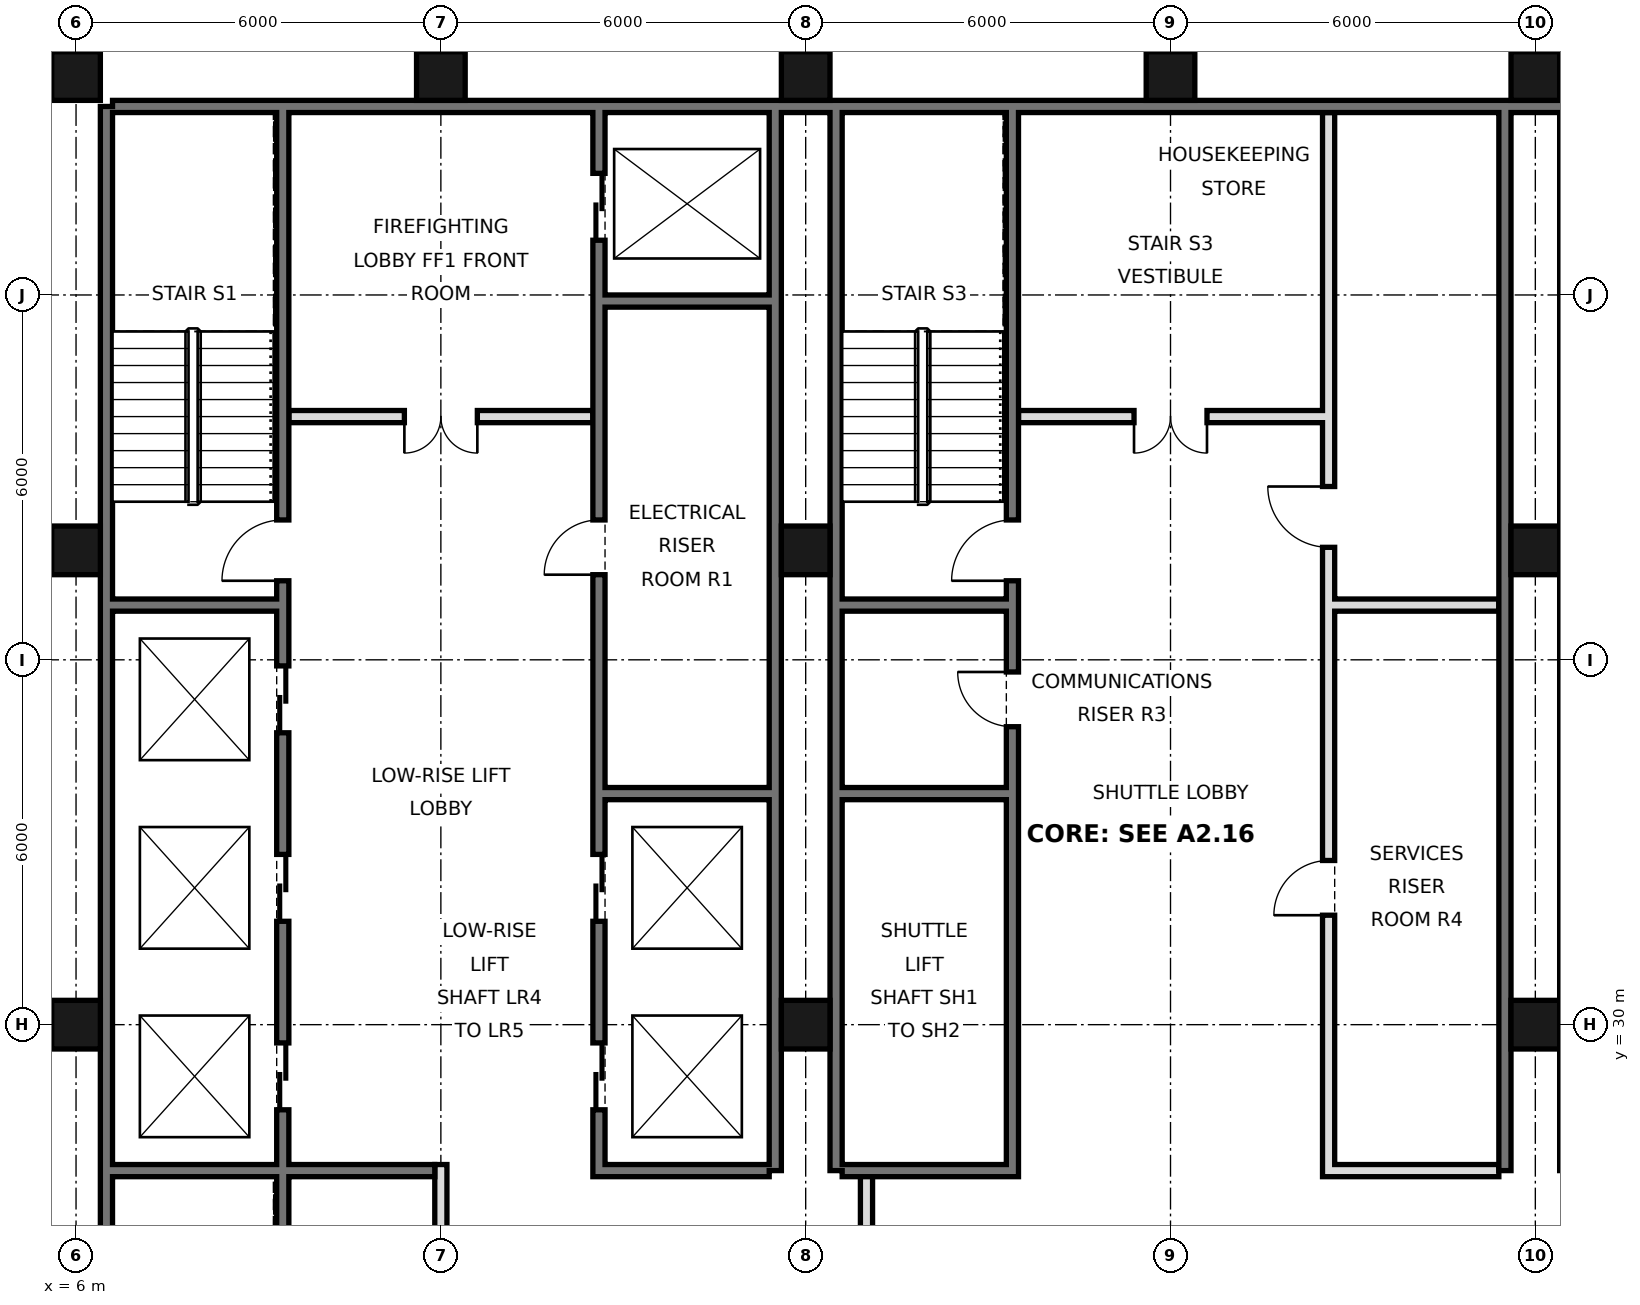
"""IFC4 building model, lengths in metres.
Left out: names, types, materials, properties, quantities, classifications, styles, units other than length and angle.
Written with IfcOpenShell. Run it as: python <this file> out.ifc"""

import sys

from ifc_helpers import new_model, si_unit, direction, frame, frame_2d, origin, origin_2d, place, context, subcontext, project, spatial, rectangle, hollow_rectangle, extrude, element, fill, save


model = new_model("IFC4")
c1 = context("Model", 3, precision=1e-05, world=origin(), true_north=direction((0.0, 1.0)))
c2 = subcontext(c1, "Body", "Model", "MODEL_VIEW")
j1 = project(units=[si_unit("LENGTHUNIT", "METRE"), si_unit("PLANEANGLEUNIT", "RADIAN")], contexts=[c1])
p1 = place(None, origin())
s1 = spatial("IfcSite", under=j1, at=p1, CompositionType="ELEMENT")
p2 = place(p1, origin())
s2 = spatial("IfcBuilding", under=s1, at=p2, CompositionType="ELEMENT")
p3 = place(p2, frame((0.0, 0.0, 64.2)))
s3 = spatial("IfcBuildingStorey", under=s2, at=p3, CompositionType="ELEMENT", Elevation=64.2)
for number, where, z_axis, x_axis in (
    (1, (6.0, 30.0, 0.0), (0.0, 0.0, 1.0), (1.0, 0.0, 0.0)),
    (2, (6.0, 37.8, 0.0), (0.0, 0.0, 1.0), (1.0, 0.0, 0.0)),
    (3, (6.0, 45.6, 0.0), (0.0, 0.0, 1.0), (1.0, 0.0, 0.0)),
    (4, (12.0, 45.6, 0.0), (0.0, 0.0, 1.0), (1.0, 0.0, 0.0)),
    (5, (18.0, 30.0, 0.0), (0.0, 0.0, 1.0), (1.0, 0.0, 0.0)),
    (6, (18.0, 37.8, 0.0), (0.0, 0.0, 1.0), (1.0, 0.0, 0.0)),
    (7, (18.0, 45.6, 0.0), (0.0, 0.0, 1.0), (1.0, 0.0, 0.0)),
    (8, (24.0, 45.6, 0.0), (0.0, 0.0, 1.0), (1.0, 0.0, 0.0)),
    (9, (30.0, 30.0, 0.0), (0.0, 0.0, 1.0), (1.0, 0.0, 0.0)),
    (10, (30.0, 37.8, 0.0), (0.0, 0.0, 1.0), (1.0, 0.0, 0.0)),
    (11, (30.0, 45.6, 0.0), (0.0, 0.0, 1.0), (1.0, 0.0, 0.0)),
):
    element("IfcColumn", number, at=place(p3, frame(where, z_axis=z_axis, x_axis=x_axis)), inside=s3, PredefinedType="COLUMN", context=c2, shape_type="SweptSolid", body=[
        extrude(hollow_rectangle(XDim=0.8, YDim=0.8, WallThickness=0.06, at=origin_2d()), origin(), (0.0, 0.0, 1.0), 3.6),
    ])
p4 = place(p3, frame((6.5, 21.6, 0.0), z_axis=(0.0, 0.0, 1.0), x_axis=(0.0, 1.0, 0.0)))
e12 = element("IfcWall", 12, at=p4, inside=s3, PredefinedType="SOLIDWALL", context=c2, shape_type="SweptSolid", body=[
    extrude(rectangle(XDim=23.5, YDim=0.2, at=frame_2d((11.75, 0.0))), origin(), (0.0, 0.0, 1.0), 3.42),
])
p5 = place(p3, frame((6.6, 45.1, 0.0), z_axis=(0.0, 0.0, 1.0), x_axis=(1.0, 0.0, 0.0)))
e13 = element("IfcWall", 13, at=p5, inside=s3, PredefinedType="SOLIDWALL", context=c2, shape_type="SweptSolid", body=[
    extrude(rectangle(XDim=34.8, YDim=0.2, at=frame_2d((17.4, 0.0))), origin(), (0.0, 0.0, 1.0), 3.42),
])
for number, where, z_axis, x_axis in (
    (14, (17.5, 27.6, 0.0), (0.0, 0.0, 1.0), (0.0, 1.0, 0.0)),
    (15, (18.5, 27.6, 0.0), (0.0, 0.0, 1.0), (0.0, 1.0, 0.0)),
    (16, (29.5, 27.6, 0.0), (0.0, 0.0, 1.0), (0.0, 1.0, 0.0)),
):
    element("IfcWall", number, at=place(p3, frame(where, z_axis=z_axis, x_axis=x_axis)), inside=s3, PredefinedType="SOLIDWALL", context=c2, shape_type="SweptSolid", body=[
        extrude(rectangle(XDim=17.5, YDim=0.2, at=frame_2d((8.75, 0.0))), origin(), (0.0, 0.0, 1.0), 3.42),
    ])
p6 = place(p3, frame((19.0, 21.6, 0.0), z_axis=(0.0, 0.0, 1.0), x_axis=(0.0, 1.0, 0.0)))
e17 = element("IfcWall", 17, at=p6, inside=s3, PredefinedType="PARTITIONING", context=c2, shape_type="SweptSolid", body=[
    extrude(rectangle(XDim=6.0, YDim=0.2, at=frame_2d((3.0, 0.0))), origin(), (0.0, 0.0, 1.0), 3.42),
])
p7 = place(p6, frame((2.1, 0.0, 0.0)))
e18 = element("IfcOpeningElement", 18, at=p7, cuts=e17, PredefinedType="OPENING", context=c2, shape_type="SweptSolid", body=[
    extrude(rectangle(XDim=1.8, YDim=2.1, at=frame_2d((0.9, 1.05))), frame((0.0, 0.11, 0.0), z_axis=(0.0, -1.0, 0.0), x_axis=(1.0, 0.0, 0.0)), (0.0, 0.0, 1.0), 0.22),
])
p8 = place(p3, frame((12.0, 21.6, 0.0), z_axis=(0.0, 0.0, 1.0), x_axis=(0.0, 1.0, 0.0)))
e19 = element("IfcWall", 19, at=p8, inside=s3, PredefinedType="PARTITIONING", context=c2, shape_type="SweptSolid", body=[
    extrude(rectangle(XDim=6.1, YDim=0.2, at=frame_2d((3.05, 0.0))), origin(), (0.0, 0.0, 1.0), 3.42),
])
p9 = place(p3, frame((14.6, 27.5, 0.0), z_axis=(0.0, 0.0, 1.0), x_axis=(0.0, 1.0, 0.0)))
e20 = element("IfcWall", 20, at=p9, inside=s3, PredefinedType="SOLIDWALL", context=c2, shape_type="SweptSolid", body=[
    extrude(rectangle(XDim=17.5, YDim=0.2, at=frame_2d((8.75, 0.0))), origin(), (0.0, 0.0, 1.0), 3.42),
])
p10 = place(p9, frame((1.1, 0.0, 0.0)))
e21 = element("IfcOpeningElement", 21, at=p10, cuts=e20, PredefinedType="OPENING", context=c2, shape_type="SweptSolid", body=[
    extrude(rectangle(XDim=1.1, YDim=2.1, at=frame_2d((0.55, 1.05))), frame((0.0, 0.11, 0.0), z_axis=(0.0, -1.0, 0.0), x_axis=(1.0, 0.0, 0.0)), (0.0, 0.0, 1.0), 0.22),
])
p11 = place(p9, frame((4.2, 0.0, 0.0)))
e22 = element("IfcOpeningElement", 22, at=p11, cuts=e20, PredefinedType="OPENING", context=c2, shape_type="SweptSolid", body=[
    extrude(rectangle(XDim=1.1, YDim=2.1, at=frame_2d((0.55, 1.05))), frame((0.0, 0.11, 0.0), z_axis=(0.0, -1.0, 0.0), x_axis=(1.0, 0.0, 0.0)), (0.0, 0.0, 1.0), 0.22),
])
p12 = place(p9, frame((15.4, 0.0, 0.0)))
e23 = element("IfcOpeningElement", 23, at=p12, cuts=e20, PredefinedType="OPENING", context=c2, shape_type="SweptSolid", body=[
    extrude(rectangle(XDim=1.1, YDim=2.1, at=frame_2d((0.55, 1.05))), frame((0.0, 0.11, 0.0), z_axis=(0.0, -1.0, 0.0), x_axis=(1.0, 0.0, 0.0)), (0.0, 0.0, 1.0), 0.22),
])
p13 = place(p9, frame((9.9, 0.0, 0.0)))
e24 = element("IfcOpeningElement", 24, at=p13, cuts=e20, PredefinedType="OPENING", context=c2, shape_type="SweptSolid", body=[
    extrude(rectangle(XDim=0.9, YDim=2.1, at=frame_2d((0.45, 1.05))), frame((0.0, 0.11, 0.0), z_axis=(0.0, -1.0, 0.0), x_axis=(1.0, 0.0, 0.0)), (0.0, 0.0, 1.0), 0.22),
])
p14 = place(p3, frame((21.4, 27.5, 0.0), z_axis=(0.0, 0.0, 1.0), x_axis=(0.0, 1.0, 0.0)))
e25 = element("IfcWall", 25, at=p14, inside=s3, PredefinedType="SOLIDWALL", context=c2, shape_type="SweptSolid", body=[
    extrude(rectangle(XDim=17.5, YDim=0.2, at=frame_2d((8.75, 0.0))), origin(), (0.0, 0.0, 1.0), 3.42),
])
p15 = place(p14, frame((9.8, 0.0, 0.0)))
e26 = element("IfcOpeningElement", 26, at=p15, cuts=e25, PredefinedType="OPENING", context=c2, shape_type="SweptSolid", body=[
    extrude(rectangle(XDim=1.0, YDim=2.1, at=frame_2d((0.5, 1.05))), frame((0.0, 0.11, 0.0), z_axis=(0.0, -1.0, 0.0), x_axis=(1.0, 0.0, 0.0)), (0.0, 0.0, 1.0), 0.22),
])
p16 = place(p14, frame((7.4, 0.0, 0.0)))
e27 = element("IfcOpeningElement", 27, at=p16, cuts=e25, PredefinedType="OPENING", context=c2, shape_type="SweptSolid", body=[
    extrude(rectangle(XDim=0.9, YDim=2.1, at=frame_2d((0.45, 1.05))), frame((0.0, 0.11, 0.0), z_axis=(0.0, -1.0, 0.0), x_axis=(1.0, 0.0, 0.0)), (0.0, 0.0, 1.0), 0.22),
])
p17 = place(p3, frame((26.6, 27.5, 0.0), z_axis=(0.0, 0.0, 1.0), x_axis=(0.0, 1.0, 0.0)))
e28 = element("IfcWall", 28, at=p17, inside=s3, PredefinedType="SOLIDWALL", context=c2, shape_type="SweptSolid", body=[
    extrude(rectangle(XDim=17.5, YDim=0.2, at=frame_2d((8.75, 0.0))), origin(), (0.0, 0.0, 1.0), 3.42),
])
p18 = place(p17, frame((4.3, 0.0, 0.0)))
e29 = element("IfcOpeningElement", 29, at=p18, cuts=e28, PredefinedType="OPENING", context=c2, shape_type="SweptSolid", body=[
    extrude(rectangle(XDim=0.9, YDim=2.1, at=frame_2d((0.45, 1.05))), frame((0.0, 0.11, 0.0), z_axis=(0.0, -1.0, 0.0), x_axis=(1.0, 0.0, 0.0)), (0.0, 0.0, 1.0), 0.22),
])
p19 = place(p17, frame((10.35, 0.0, 0.0)))
e30 = element("IfcOpeningElement", 30, at=p19, cuts=e28, PredefinedType="OPENING", context=c2, shape_type="SweptSolid", body=[
    extrude(rectangle(XDim=1.0, YDim=2.1, at=frame_2d((0.5, 1.05))), frame((0.0, 0.11, 0.0), z_axis=(0.0, -1.0, 0.0), x_axis=(1.0, 0.0, 0.0)), (0.0, 0.0, 1.0), 0.22),
])
p20 = place(p3, frame((9.4, 21.6, 0.0), z_axis=(0.0, 0.0, 1.0), x_axis=(0.0, 1.0, 0.0)))
e31 = element("IfcWall", 31, at=p20, inside=s3, PredefinedType="SOLIDWALL", context=c2, shape_type="SweptSolid", body=[
    extrude(rectangle(XDim=23.4, YDim=0.2, at=frame_2d((11.7, 0.0))), origin(), (0.0, 0.0, 1.0), 3.42),
])
p21 = place(p20, frame((7.0, 0.0, 0.0)))
e32 = element("IfcOpeningElement", 32, at=p21, cuts=e31, PredefinedType="OPENING", context=c2, shape_type="SweptSolid", body=[
    extrude(rectangle(XDim=1.1, YDim=2.1, at=frame_2d((0.55, 1.05))), frame((0.0, 0.11, 0.0), z_axis=(0.0, -1.0, 0.0), x_axis=(1.0, 0.0, 0.0)), (0.0, 0.0, 1.0), 0.22),
])
p22 = place(p20, frame((10.1, 0.0, 0.0)))
e33 = element("IfcOpeningElement", 33, at=p22, cuts=e31, PredefinedType="OPENING", context=c2, shape_type="SweptSolid", body=[
    extrude(rectangle(XDim=1.1, YDim=2.1, at=frame_2d((0.55, 1.05))), frame((0.0, 0.11, 0.0), z_axis=(0.0, -1.0, 0.0), x_axis=(1.0, 0.0, 0.0)), (0.0, 0.0, 1.0), 0.22),
])
p23 = place(p20, frame((13.2, 0.0, 0.0)))
e34 = element("IfcOpeningElement", 34, at=p23, cuts=e31, PredefinedType="OPENING", context=c2, shape_type="SweptSolid", body=[
    extrude(rectangle(XDim=1.1, YDim=2.1, at=frame_2d((0.55, 1.05))), frame((0.0, 0.11, 0.0), z_axis=(0.0, -1.0, 0.0), x_axis=(1.0, 0.0, 0.0)), (0.0, 0.0, 1.0), 0.22),
])
p24 = place(p20, frame((15.7, 0.0, 0.0)))
e35 = element("IfcOpeningElement", 35, at=p24, cuts=e31, PredefinedType="OPENING", context=c2, shape_type="SweptSolid", body=[
    extrude(rectangle(XDim=1.0, YDim=2.1, at=frame_2d((0.5, 1.05))), frame((0.0, 0.11, 0.0), z_axis=(0.0, -1.0, 0.0), x_axis=(1.0, 0.0, 0.0)), (0.0, 0.0, 1.0), 0.22),
])
p25 = place(p20, frame((0.175, 0.0, 0.0)))
e36 = element("IfcOpeningElement", 36, at=p25, cuts=e31, PredefinedType="OPENING", context=c2, shape_type="SweptSolid", body=[
    extrude(rectangle(XDim=0.9, YDim=2.1, at=frame_2d((0.45, 1.05))), frame((0.0, 0.11, 0.0), z_axis=(0.0, -1.0, 0.0), x_axis=(1.0, 0.0, 0.0)), (0.0, 0.0, 1.0), 0.22),
])
for number, where, z_axis, x_axis in (
    (37, (14.7, 27.6, 0.0), (0.0, 0.0, 1.0), (1.0, 0.0, 0.0)),
    (38, (18.6, 27.6, 0.0), (0.0, 0.0, 1.0), (1.0, 0.0, 0.0)),
    (39, (26.7, 27.6, 0.0), (0.0, 0.0, 1.0), (1.0, 0.0, 0.0)),
):
    element("IfcWall", number, at=place(p3, frame(where, z_axis=z_axis, x_axis=x_axis)), inside=s3, PredefinedType="SOLIDWALL", context=c2, shape_type="SweptSolid", body=[
        extrude(rectangle(XDim=2.7, YDim=0.2, at=frame_2d((1.35, 0.0))), origin(), (0.0, 0.0, 1.0), 3.42),
    ])
p26 = place(p3, frame((6.6, 27.6, 0.0), z_axis=(0.0, 0.0, 1.0), x_axis=(1.0, 0.0, 0.0)))
e40 = element("IfcWall", 40, at=p26, inside=s3, PredefinedType="SOLIDWALL", context=c2, shape_type="SweptSolid", body=[
    extrude(rectangle(XDim=5.3, YDim=0.2, at=frame_2d((2.65, 0.0))), origin(), (0.0, 0.0, 1.0), 3.42),
])
for number, where, z_axis, x_axis in (
    (41, (14.7, 33.8, 0.0), (0.0, 0.0, 1.0), (1.0, 0.0, 0.0)),
    (42, (18.6, 33.8, 0.0), (0.0, 0.0, 1.0), (1.0, 0.0, 0.0)),
    (43, (18.6, 36.9, 0.0), (0.0, 0.0, 1.0), (1.0, 0.0, 0.0)),
    (44, (26.7, 36.9, 0.0), (0.0, 0.0, 1.0), (1.0, 0.0, 0.0)),
    (45, (6.6, 36.9, 0.0), (0.0, 0.0, 1.0), (1.0, 0.0, 0.0)),
):
    element("IfcWall", number, at=place(p3, frame(where, z_axis=z_axis, x_axis=x_axis)), inside=s3, PredefinedType="SOLIDWALL", context=c2, shape_type="SweptSolid", body=[
        extrude(rectangle(XDim=2.7, YDim=0.2, at=frame_2d((1.35, 0.0))), origin(), (0.0, 0.0, 1.0), 3.42),
    ])
p27 = place(p3, frame((21.5, 40.0, 0.0), z_axis=(0.0, 0.0, 1.0), x_axis=(1.0, 0.0, 0.0)))
e46 = element("IfcWall", 46, at=p27, inside=s3, PredefinedType="PARTITIONING", context=c2, shape_type="SweptSolid", body=[
    extrude(rectangle(XDim=5.0, YDim=0.2, at=frame_2d((2.5, 0.0))), origin(), (0.0, 0.0, 1.0), 3.42),
])
p28 = place(p27, frame((1.9, 0.0, 0.0)))
e47 = element("IfcOpeningElement", 47, at=p28, cuts=e46, PredefinedType="OPENING", context=c2, shape_type="SweptSolid", body=[
    extrude(rectangle(XDim=1.2, YDim=2.1, at=frame_2d((0.6, 1.05))), frame((0.0, 0.11, 0.0), z_axis=(0.0, -1.0, 0.0), x_axis=(1.0, 0.0, 0.0)), (0.0, 0.0, 1.0), 0.22),
])
p29 = place(p3, frame((9.5, 40.0, 0.0), z_axis=(0.0, 0.0, 1.0), x_axis=(1.0, 0.0, 0.0)))
e48 = element("IfcWall", 48, at=p29, inside=s3, PredefinedType="PARTITIONING", context=c2, shape_type="SweptSolid", body=[
    extrude(rectangle(XDim=5.0, YDim=0.2, at=frame_2d((2.5, 0.0))), origin(), (0.0, 0.0, 1.0), 3.42),
])
p30 = place(p29, frame((1.9, 0.0, 0.0)))
e49 = element("IfcOpeningElement", 49, at=p30, cuts=e48, PredefinedType="OPENING", context=c2, shape_type="SweptSolid", body=[
    extrude(rectangle(XDim=1.2, YDim=2.1, at=frame_2d((0.6, 1.05))), frame((0.0, 0.11, 0.0), z_axis=(0.0, -1.0, 0.0), x_axis=(1.0, 0.0, 0.0)), (0.0, 0.0, 1.0), 0.22),
])
p31 = place(p3, frame((14.7, 41.9, 0.0), z_axis=(0.0, 0.0, 1.0), x_axis=(1.0, 0.0, 0.0)))
e50 = element("IfcWall", 50, at=p31, inside=s3, PredefinedType="SOLIDWALL", context=c2, shape_type="SweptSolid", body=[
    extrude(rectangle(XDim=2.7, YDim=0.2, at=frame_2d((1.35, 0.0))), origin(), (0.0, 0.0, 1.0), 3.42),
])
p32 = place(p30, frame((1.2, 0.0, 0.0), z_axis=(0.0, 0.0, 1.0), x_axis=(-1.0, 0.0, 0.0)))
e51 = element("IfcDoor", 51, at=p32, inside=s3, OperationType="DOUBLE_DOOR_SINGLE_SWING", PredefinedType="DOOR", context=c2, shape_type="SweptSolid", body=[
    extrude(rectangle(XDim=1.2, YDim=2.1, at=frame_2d((0.6, 1.05))), frame((0.0, 0.025, 0.0), z_axis=(0.0, -1.0, 0.0), x_axis=(1.0, 0.0, 0.0)), (0.0, 0.0, 1.0), 0.05),
])
fill(e49, e51)
p33 = place(p28, frame((1.2, 0.0, 0.0), z_axis=(0.0, 0.0, 1.0), x_axis=(-1.0, 0.0, 0.0)))
e52 = element("IfcDoor", 52, at=p33, inside=s3, OperationType="DOUBLE_DOOR_SINGLE_SWING", PredefinedType="DOOR", context=c2, shape_type="SweptSolid", body=[
    extrude(rectangle(XDim=1.2, YDim=2.1, at=frame_2d((0.6, 1.05))), frame((0.0, 0.025, 0.0), z_axis=(0.0, -1.0, 0.0), x_axis=(1.0, 0.0, 0.0)), (0.0, 0.0, 1.0), 0.05),
])
fill(e47, e52)
p34 = place(p10, origin())
e53 = element("IfcDoor", 53, at=p34, inside=s3, OperationType="DOUBLE_DOOR_SLIDING", PredefinedType="DOOR", context=c2, shape_type="SweptSolid", body=[
    extrude(rectangle(XDim=1.1, YDim=2.1, at=frame_2d((0.55, 1.05))), frame((0.0, 0.025, 0.0), z_axis=(0.0, -1.0, 0.0), x_axis=(1.0, 0.0, 0.0)), (0.0, 0.0, 1.0), 0.05),
])
fill(e21, e53)
p35 = place(p11, origin())
e54 = element("IfcDoor", 54, at=p35, inside=s3, OperationType="DOUBLE_DOOR_SLIDING", PredefinedType="DOOR", context=c2, shape_type="SweptSolid", body=[
    extrude(rectangle(XDim=1.1, YDim=2.1, at=frame_2d((0.55, 1.05))), frame((0.0, 0.025, 0.0), z_axis=(0.0, -1.0, 0.0), x_axis=(1.0, 0.0, 0.0)), (0.0, 0.0, 1.0), 0.05),
])
fill(e22, e54)
p36 = place(p12, origin())
e55 = element("IfcDoor", 55, at=p36, inside=s3, OperationType="DOUBLE_DOOR_SLIDING", PredefinedType="DOOR", context=c2, shape_type="SweptSolid", body=[
    extrude(rectangle(XDim=1.1, YDim=2.1, at=frame_2d((0.55, 1.05))), frame((0.0, 0.025, 0.0), z_axis=(0.0, -1.0, 0.0), x_axis=(1.0, 0.0, 0.0)), (0.0, 0.0, 1.0), 0.05),
])
fill(e23, e55)
p37 = place(p21, origin())
e56 = element("IfcDoor", 56, at=p37, inside=s3, OperationType="DOUBLE_DOOR_SLIDING", PredefinedType="DOOR", context=c2, shape_type="SweptSolid", body=[
    extrude(rectangle(XDim=1.1, YDim=2.1, at=frame_2d((0.55, 1.05))), frame((0.0, 0.025, 0.0), z_axis=(0.0, -1.0, 0.0), x_axis=(1.0, 0.0, 0.0)), (0.0, 0.0, 1.0), 0.05),
])
fill(e32, e56)
p38 = place(p22, origin())
e57 = element("IfcDoor", 57, at=p38, inside=s3, OperationType="DOUBLE_DOOR_SLIDING", PredefinedType="DOOR", context=c2, shape_type="SweptSolid", body=[
    extrude(rectangle(XDim=1.1, YDim=2.1, at=frame_2d((0.55, 1.05))), frame((0.0, 0.025, 0.0), z_axis=(0.0, -1.0, 0.0), x_axis=(1.0, 0.0, 0.0)), (0.0, 0.0, 1.0), 0.05),
])
fill(e33, e57)
p39 = place(p23, origin())
e58 = element("IfcDoor", 58, at=p39, inside=s3, OperationType="DOUBLE_DOOR_SLIDING", PredefinedType="DOOR", context=c2, shape_type="SweptSolid", body=[
    extrude(rectangle(XDim=1.1, YDim=2.1, at=frame_2d((0.55, 1.05))), frame((0.0, 0.025, 0.0), z_axis=(0.0, -1.0, 0.0), x_axis=(1.0, 0.0, 0.0)), (0.0, 0.0, 1.0), 0.05),
])
fill(e34, e58)
p40 = place(p24, origin())
e59 = element("IfcDoor", 59, at=p40, inside=s3, OperationType="SINGLE_SWING_LEFT", PredefinedType="DOOR", context=c2, shape_type="SweptSolid", body=[
    extrude(rectangle(XDim=1.0, YDim=2.1, at=frame_2d((0.5, 1.05))), frame((0.0, 0.025, 0.0), z_axis=(0.0, -1.0, 0.0), x_axis=(1.0, 0.0, 0.0)), (0.0, 0.0, 1.0), 0.05),
])
fill(e35, e59)
p41 = place(p15, origin())
e60 = element("IfcDoor", 60, at=p41, inside=s3, OperationType="SINGLE_SWING_LEFT", PredefinedType="DOOR", context=c2, shape_type="SweptSolid", body=[
    extrude(rectangle(XDim=1.0, YDim=2.1, at=frame_2d((0.5, 1.05))), frame((0.0, 0.025, 0.0), z_axis=(0.0, -1.0, 0.0), x_axis=(1.0, 0.0, 0.0)), (0.0, 0.0, 1.0), 0.05),
])
fill(e26, e60)
p42 = place(p13, origin())
e61 = element("IfcDoor", 61, at=p42, inside=s3, OperationType="SINGLE_SWING_LEFT", PredefinedType="DOOR", context=c2, shape_type="SweptSolid", body=[
    extrude(rectangle(XDim=0.9, YDim=2.1, at=frame_2d((0.45, 1.05))), frame((0.0, 0.025, 0.0), z_axis=(0.0, -1.0, 0.0), x_axis=(1.0, 0.0, 0.0)), (0.0, 0.0, 1.0), 0.05),
])
fill(e24, e61)
p43 = place(p16, frame((0.9, 0.0, 0.0), z_axis=(0.0, 0.0, 1.0), x_axis=(-1.0, 0.0, 0.0)))
e62 = element("IfcDoor", 62, at=p43, inside=s3, OperationType="SINGLE_SWING_LEFT", PredefinedType="DOOR", context=c2, shape_type="SweptSolid", body=[
    extrude(rectangle(XDim=0.9, YDim=2.1, at=frame_2d((0.45, 1.05))), frame((0.0, 0.025, 0.0), z_axis=(0.0, -1.0, 0.0), x_axis=(1.0, 0.0, 0.0)), (0.0, 0.0, 1.0), 0.05),
])
fill(e27, e62)
p44 = place(p18, origin())
e63 = element("IfcDoor", 63, at=p44, inside=s3, OperationType="SINGLE_SWING_LEFT", PredefinedType="DOOR", context=c2, shape_type="SweptSolid", body=[
    extrude(rectangle(XDim=0.9, YDim=2.1, at=frame_2d((0.45, 1.05))), frame((0.0, 0.025, 0.0), z_axis=(0.0, -1.0, 0.0), x_axis=(1.0, 0.0, 0.0)), (0.0, 0.0, 1.0), 0.05),
])
fill(e29, e63)
p45 = place(p19, frame((1.0, 0.0, 0.0), z_axis=(0.0, 0.0, 1.0), x_axis=(-1.0, 0.0, 0.0)))
e64 = element("IfcDoor", 64, at=p45, inside=s3, OperationType="SINGLE_SWING_LEFT", PredefinedType="DOOR", context=c2, shape_type="SweptSolid", body=[
    extrude(rectangle(XDim=1.0, YDim=2.1, at=frame_2d((0.5, 1.05))), frame((0.0, 0.025, 0.0), z_axis=(0.0, -1.0, 0.0), x_axis=(1.0, 0.0, 0.0)), (0.0, 0.0, 1.0), 0.05),
])
fill(e30, e64)
save(model, sys.argv[1])
